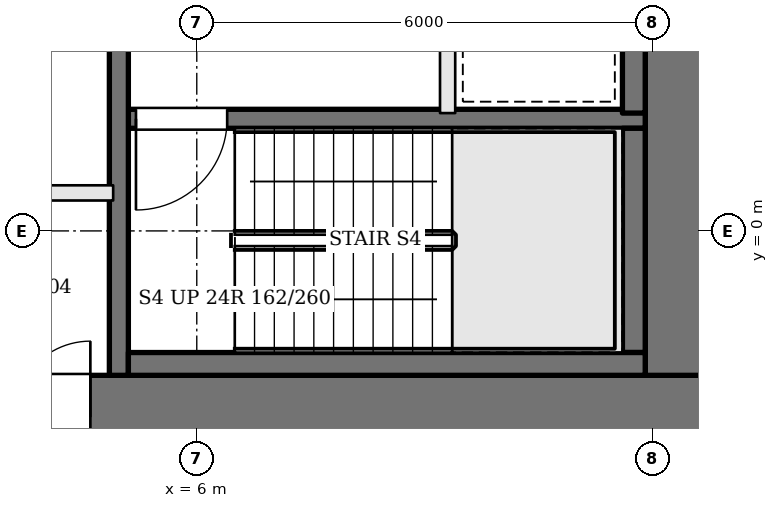
"""IFC4 building model, lengths in metres.
Left out: names, types, materials, properties, quantities, classifications, styles, units other than length and angle.
Written with IfcOpenShell. Run it as: python <this file> out.ifc"""

import sys

from ifc_helpers import new_model, si_unit, direction, frame, frame_2d, origin, place, context, subcontext, project, spatial, rectangle, extrude, element, fill, save


model = new_model("IFC4")
c1 = context("Model", 3, precision=1e-05, world=origin(), true_north=direction((0.0, 1.0)))
c2 = subcontext(c1, "Body", "Model", "MODEL_VIEW")
j1 = project(units=[si_unit("LENGTHUNIT", "METRE"), si_unit("PLANEANGLEUNIT", "RADIAN")], contexts=[c1])
p1 = place(None, origin())
s1 = spatial("IfcSite", under=j1, at=p1, CompositionType="ELEMENT")
p2 = place(p1, origin())
s2 = spatial("IfcBuilding", under=s1, at=p2, CompositionType="ELEMENT")
p3 = place(p2, frame((0.0, 0.0, 157.8)))
s3 = spatial("IfcBuildingStorey", under=s2, at=p3, CompositionType="ELEMENT", Elevation=157.8)
p4 = place(p3, frame((-13.0, -2.45, 0.0), z_axis=(0.0, 0.0, 1.0), x_axis=(1.0, 0.0, 0.0)))
e1 = element("IfcWall", 1, at=p4, inside=s3, PredefinedType="SHEAR", context=c2, shape_type="SweptSolid", body=[
    extrude(rectangle(XDim=26.0, YDim=1.1, at=frame_2d((13.0, 0.0))), origin(), (0.0, 0.0, 1.0), 3.9),
])
p5 = place(p4, frame((8.5, 0.0, 0.0)))
e2 = element("IfcOpeningElement", 2, at=p5, cuts=e1, PredefinedType="OPENING", context=c2, shape_type="SweptSolid", body=[
    extrude(rectangle(XDim=1.0, YDim=2.1, at=frame_2d((0.5, 1.05))), frame((0.0, 0.56, 0.0), z_axis=(0.0, -1.0, 0.0), x_axis=(1.0, 0.0, 0.0)), (0.0, 0.0, 1.0), 1.12),
])
p6 = place(p4, frame((11.025, 0.0, 0.0)))
e3 = element("IfcOpeningElement", 3, at=p6, cuts=e1, PredefinedType="OPENING", context=c2, shape_type="SweptSolid", body=[
    extrude(rectangle(XDim=0.9, YDim=2.1, at=frame_2d((0.45, 1.05))), frame((0.0, 0.56, 0.0), z_axis=(0.0, -1.0, 0.0), x_axis=(1.0, 0.0, 0.0)), (0.0, 0.0, 1.0), 1.12),
])
p7 = place(p4, frame((14.225, 0.0, 0.0)))
e4 = element("IfcOpeningElement", 4, at=p7, cuts=e1, PredefinedType="OPENING", context=c2, shape_type="SweptSolid", body=[
    extrude(rectangle(XDim=0.9, YDim=2.1, at=frame_2d((0.45, 1.05))), frame((0.0, 0.56, 0.0), z_axis=(0.0, -1.0, 0.0), x_axis=(1.0, 0.0, 0.0)), (0.0, 0.0, 1.0), 1.12),
])
p8 = place(p4, frame((16.6, 0.0, 0.0)))
e5 = element("IfcOpeningElement", 5, at=p8, cuts=e1, PredefinedType="OPENING", context=c2, shape_type="SweptSolid", body=[
    extrude(rectangle(XDim=1.0, YDim=2.1, at=frame_2d((0.5, 1.05))), frame((0.0, 0.56, 0.0), z_axis=(0.0, -1.0, 0.0), x_axis=(1.0, 0.0, 0.0)), (0.0, 0.0, 1.0), 1.12),
])
p9 = place(p3, frame((12.45, -1.9, 0.0), z_axis=(0.0, 0.0, 1.0), x_axis=(0.0, 1.0, 0.0)))
e6 = element("IfcWall", 6, at=p9, inside=s3, PredefinedType="SHEAR", context=c2, shape_type="SweptSolid", body=[
    extrude(rectangle(XDim=12.8, YDim=1.1, at=frame_2d((6.4, 0.0))), origin(), (0.0, 0.0, 1.0), 3.9),
])
p10 = place(p9, frame((7.1, 0.0, 0.0)))
e7 = element("IfcOpeningElement", 7, at=p10, cuts=e6, PredefinedType="OPENING", context=c2, shape_type="SweptSolid", body=[
    extrude(rectangle(XDim=1.8, YDim=2.1, at=frame_2d((0.9, 1.05))), frame((0.0, 0.56, 0.0), z_axis=(0.0, -1.0, 0.0), x_axis=(1.0, 0.0, 0.0)), (0.0, 0.0, 1.0), 1.12),
])
p11 = place(p3, frame((11.9, 1.475, 0.0), z_axis=(0.0, 0.0, 1.0), x_axis=(-1.0, 0.0, 0.0)))
e8 = element("IfcWall", 8, at=p11, inside=s3, PredefinedType="SOLIDWALL", context=c2, shape_type="SweptSolid", body=[
    extrude(rectangle(XDim=6.8, YDim=0.25, at=frame_2d((3.4, 0.0))), origin(), (0.0, 0.0, 1.0), 3.7),
])
p12 = place(p11, frame((5.5, 0.0, 0.0)))
e9 = element("IfcOpeningElement", 9, at=p12, cuts=e8, PredefinedType="OPENING", context=c2, shape_type="SweptSolid", body=[
    extrude(rectangle(XDim=1.2, YDim=2.1, at=frame_2d((0.6, 1.05))), frame((0.0, 0.135, 0.0), z_axis=(0.0, -1.0, 0.0), x_axis=(1.0, 0.0, 0.0)), (0.0, 0.0, 1.0), 0.27),
])
p13 = place(p3, frame((9.3, 4.55, 0.0), z_axis=(0.0, 0.0, 1.0), x_axis=(0.0, -1.0, 0.0)))
e10 = element("IfcWall", 10, at=p13, inside=s3, PredefinedType="SOLIDWALL", context=c2, shape_type="SweptSolid", body=[
    extrude(rectangle(XDim=3.0, YDim=0.2, at=frame_2d((1.5, 0.0))), origin(), (0.0, 0.0, 1.0), 3.7),
])
p14 = place(p3, frame((4.975, 10.9, 0.0), z_axis=(0.0, 0.0, 1.0), x_axis=(0.0, -1.0, 0.0)))
e11 = element("IfcWall", 11, at=p14, inside=s3, PredefinedType="SOLIDWALL", context=c2, shape_type="SweptSolid", body=[
    extrude(rectangle(XDim=12.8, YDim=0.25, at=frame_2d((6.4, 0.0))), origin(), (0.0, 0.0, 1.0), 3.7),
])
p15 = place(p14, frame((4.95, 0.0, 0.0)))
e12 = element("IfcOpeningElement", 12, at=p15, cuts=e11, PredefinedType="OPENING", context=c2, shape_type="SweptSolid", body=[
    extrude(rectangle(XDim=1.2, YDim=2.1, at=frame_2d((0.6, 1.05))), frame((0.0, 0.135, 0.0), z_axis=(0.0, -1.0, 0.0), x_axis=(1.0, 0.0, 0.0)), (0.0, 0.0, 1.0), 0.27),
])
p16 = place(p3, frame((11.75, 4.55, 0.0), z_axis=(0.0, 0.0, 1.0), x_axis=(0.0, -1.0, 0.0)))
e13 = element("IfcWall", 13, at=p16, inside=s3, PredefinedType="SOLIDWALL", context=c2, shape_type="SweptSolid", body=[
    extrude(rectangle(XDim=3.0, YDim=0.3, at=frame_2d((1.5, 0.0))), origin(), (0.0, 0.0, 1.0), 3.7),
])
p17 = place(p3, frame((11.75, 1.35, 0.0), z_axis=(0.0, 0.0, 1.0), x_axis=(0.0, -1.0, 0.0)))
e14 = element("IfcWall", 14, at=p17, inside=s3, PredefinedType="SOLIDWALL", context=c2, shape_type="SweptSolid", body=[
    extrude(rectangle(XDim=2.95, YDim=0.3, at=frame_2d((1.475, 0.0))), origin(), (0.0, 0.0, 1.0), 3.7),
])
p18 = place(p3, frame((11.9, -1.75, 0.0), z_axis=(0.0, 0.0, 1.0), x_axis=(-1.0, 0.0, 0.0)))
e15 = element("IfcWall", 15, at=p18, inside=s3, PredefinedType="SOLIDWALL", context=c2, shape_type="SweptSolid", body=[
    extrude(rectangle(XDim=6.8, YDim=0.3, at=frame_2d((3.4, 0.0))), origin(), (0.0, 0.0, 1.0), 3.7),
])
p19 = place(p3, frame((-4.9, 0.5, 0.0), z_axis=(0.0, 0.0, 1.0), x_axis=(1.0, 0.0, 0.0)))
e16 = element("IfcWall", 16, at=p19, inside=s3, PredefinedType="SOLIDWALL", context=c2, shape_type="SweptSolid", body=[
    extrude(rectangle(XDim=9.8, YDim=0.2, at=frame_2d((4.9, 0.0))), origin(), (0.0, 0.0, 1.0), 3.7),
])
p20 = place(p12, origin())
e17 = element("IfcDoor", 17, at=p20, inside=s3, OperationType="SINGLE_SWING_RIGHT", PredefinedType="DOOR", context=c2, shape_type="SweptSolid", body=[
    extrude(rectangle(XDim=1.2, YDim=2.1, at=frame_2d((0.6, 1.05))), frame((0.0, 0.025, 0.0), z_axis=(0.0, -1.0, 0.0), x_axis=(1.0, 0.0, 0.0)), (0.0, 0.0, 1.0), 0.05),
])
fill(e9, e17)
p21 = place(p8, origin())
e18 = element("IfcDoor", 18, at=p21, inside=s3, OperationType="SINGLE_SWING_RIGHT", PredefinedType="DOOR", context=c2, shape_type="SweptSolid", body=[
    extrude(rectangle(XDim=1.0, YDim=2.1, at=frame_2d((0.5, 1.05))), frame((0.0, 0.025, 0.0), z_axis=(0.0, -1.0, 0.0), x_axis=(1.0, 0.0, 0.0)), (0.0, 0.0, 1.0), 0.05),
])
fill(e5, e18)
save(model, sys.argv[1])
